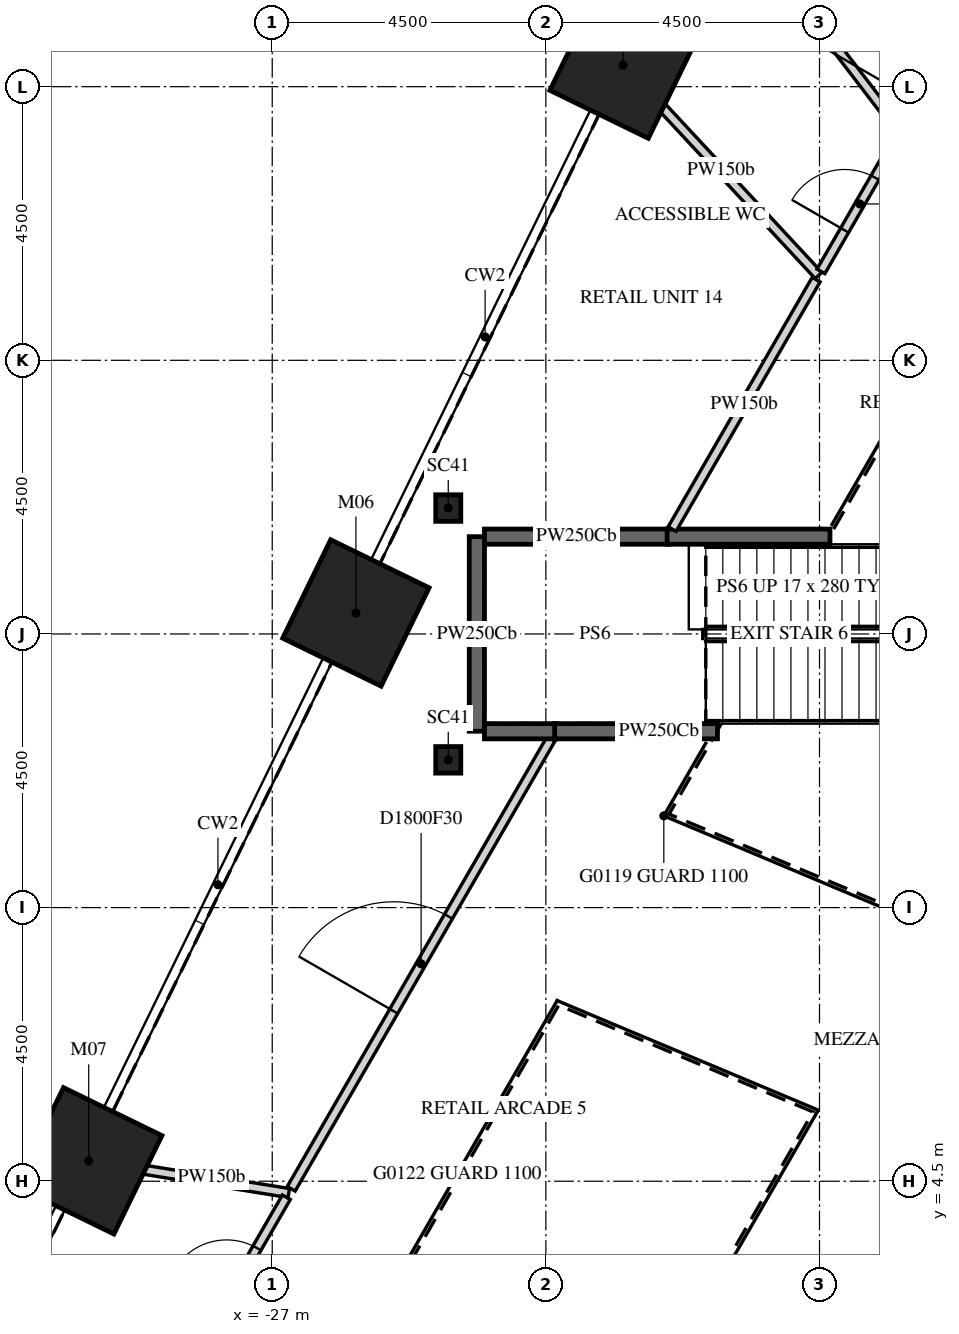
"""IFC4 building model, lengths in metres.
Left out: names, types, materials, properties, quantities, classifications, styles, units other than length and angle.
Written with IfcOpenShell. Run it as: python <this file> out.ifc"""

import sys

from ifc_helpers import new_model, si_unit, direction, frame, frame_2d, origin, origin_2d, place, context, subcontext, project, spatial, rectangle, i_section, extrude, element, fill, save


model = new_model("IFC4")
c1 = context("Model", 3, precision=1e-05, world=origin(), true_north=direction((0.0, 1.0)))
c2 = subcontext(c1, "Body", "Model", "MODEL_VIEW")
j1 = project(units=[si_unit("LENGTHUNIT", "METRE"), si_unit("PLANEANGLEUNIT", "RADIAN")], contexts=[c1])
p1 = place(None, origin())
s1 = spatial("IfcSite", under=j1, at=p1, CompositionType="ELEMENT")
p2 = place(p1, origin())
s2 = spatial("IfcBuilding", under=s1, at=p2, CompositionType="ELEMENT")
p3 = place(p2, frame((0.0, 0.0, 9.0)))
s3 = spatial("IfcBuildingStorey", under=s2, at=p3, CompositionType="ELEMENT", Elevation=9.0)
for number, where, z_axis, x_axis in (
    (1, (-21.23, 22.854, -0.25), (0.0, 0.0, 1.0), (0.438, 0.899, 0.0)),
    (2, (-25.624, 13.845, -0.25), (0.0, 0.0, 1.0), (0.438, 0.899, 0.0)),
    (3, (-30.018, 4.836, -0.25), (0.0, 0.0, 1.0), (0.438, 0.899, 0.0)),
):
    element("IfcColumn", number, at=place(p3, frame(where, z_axis=z_axis, x_axis=x_axis)), inside=s3, PredefinedType="COLUMN", context=c2, shape_type="SweptSolid", body=[
        extrude(rectangle(XDim=1.8, YDim=1.8, at=origin_2d()), origin(), (0.0, 0.0, 1.0), 6.0),
    ])
for number, where, z_axis, x_axis in (
    (4, (-24.105, 11.43, -0.25), (0.0, 0.0, 1.0), (1.0, 0.0, 0.0)),
    (5, (-24.105, 15.57, -0.25), (0.0, 0.0, 1.0), (1.0, 0.0, 0.0)),
):
    element("IfcColumn", number, at=place(p3, frame(where, z_axis=z_axis, x_axis=x_axis)), inside=s3, PredefinedType="COLUMN", context=c2, shape_type="SweptSolid", body=[
        extrude(i_section(OverallWidth=0.412, OverallDepth=0.437, WebThickness=0.036, FlangeThickness=0.058, FilletRadius=0.015, at=origin_2d()), origin(), (0.0, 0.0, 1.0), 6.0),
    ])
p4 = place(p3, frame((-30.018, 4.836, 0.0), z_axis=(0.0, 0.0, 1.0), x_axis=(0.987270453079, -0.159050471478, 0.0)))
e6 = element("IfcWall", 6, at=p4, inside=s3, PredefinedType="PARTITIONING", context=c2, shape_type="SweptSolid", body=[
    extrude(rectangle(XDim=3.333, YDim=0.15, at=frame_2d((1.666, 0.0))), origin(), (0.0, 0.0, 1.0), 5.75),
])
p5 = place(p3, frame((-28.233, 1.7, 0.0), z_axis=(0.0, 0.0, 1.0), x_axis=(0.500083180475, 0.865977374189, 0.0)))
e7 = element("IfcWall", 7, at=p5, inside=s3, PredefinedType="PARTITIONING", context=c2, shape_type="SweptSolid", body=[
    extrude(rectangle(XDim=2.929, YDim=0.15, at=frame_2d((1.465, 0.0))), origin(), (0.0, 0.0, 1.0), 5.75),
])
p6 = place(p5, frame((0.965, 0.0, 0.0)))
e8 = element("IfcOpeningElement", 8, at=p6, cuts=e7, PredefinedType="OPENING", context=c2, shape_type="SweptSolid", body=[
    extrude(rectangle(XDim=1.0, YDim=2.1, at=frame_2d((0.5, 1.05))), frame((0.0, 0.085, 0.0), z_axis=(0.0, -1.0, 0.0), x_axis=(1.0, 0.0, 0.0)), (0.0, 0.0, 1.0), 0.17),
])
p7 = place(p3, frame((-23.635, 11.9, 0.0), z_axis=(0.0, 0.0, 1.0), x_axis=(0.0, 1.0, 0.0)))
e9 = element("IfcWall", 9, at=p7, inside=s3, PredefinedType="PARTITIONING", context=c2, shape_type="SweptSolid", body=[
    extrude(rectangle(XDim=3.2, YDim=0.25, at=frame_2d((1.6, 0.0))), origin(), (0.0, 0.0, 1.0), 5.75),
])
p8 = place(p3, frame((-23.51, 15.1, 0.0), z_axis=(0.0, 0.0, 1.0), x_axis=(1.0, 0.0, 0.0)))
e10 = element("IfcWall", 10, at=p8, inside=s3, PredefinedType="PARTITIONING", context=c2, shape_type="SweptSolid", body=[
    extrude(rectangle(XDim=3.026, YDim=0.25, at=frame_2d((1.513, 0.0))), origin(), (0.0, 0.0, 1.0), 5.75),
])
p9 = place(p3, frame((-26.688, 4.375, 0.0), z_axis=(0.0, 0.0, 1.0), x_axis=(0.500057174496, 0.865992391557, 0.0)))
e11 = element("IfcWall", 11, at=p9, inside=s3, PredefinedType="PARTITIONING", context=c2, shape_type="SweptSolid", body=[
    extrude(rectangle(XDim=8.544, YDim=0.15, at=frame_2d((4.272, 0.0))), origin(), (0.0, 0.0, 1.0), 5.75),
])
p10 = place(p9, frame((3.372, 0.0, 0.0)))
e12 = element("IfcOpeningElement", 12, at=p10, cuts=e11, PredefinedType="OPENING", context=c2, shape_type="SweptSolid", body=[
    extrude(rectangle(XDim=1.8, YDim=2.1, at=frame_2d((0.9, 1.05))), frame((0.0, 0.085, 0.0), z_axis=(0.0, -1.0, 0.0), x_axis=(1.0, 0.0, 0.0)), (0.0, 0.0, 1.0), 0.17),
])
p11 = place(p3, frame((-22.333, 11.9, 0.0), z_axis=(0.0, 0.0, 1.0), x_axis=(-1.0, 0.0, 0.0)))
e13 = element("IfcWall", 13, at=p11, inside=s3, PredefinedType="PARTITIONING", context=c2, shape_type="SweptSolid", body=[
    extrude(rectangle(XDim=1.177, YDim=0.25, at=frame_2d((0.588, 0.0))), origin(), (0.0, 0.0, 1.0), 5.75),
])
p12 = place(p3, frame((-21.23, 22.854, 0.0), z_axis=(0.0, 0.0, 1.0), x_axis=(0.680673196445, -0.732587195931, 0.0)))
e14 = element("IfcWall", 14, at=p12, inside=s3, PredefinedType="PARTITIONING", context=c2, shape_type="SweptSolid", body=[
    extrude(rectangle(XDim=4.722, YDim=0.15, at=frame_2d((2.361, 0.0))), origin(), (0.0, 0.0, 1.0), 5.75),
])
p13 = place(p3, frame((-20.506, 15.1, 0.0), z_axis=(0.0, 0.0, 1.0), x_axis=(1.0, 0.0, 0.0)))
e15 = element("IfcWall", 15, at=p13, inside=s3, PredefinedType="PARTITIONING", context=c2, shape_type="SweptSolid", body=[
    extrude(rectangle(XDim=2.678, YDim=0.25, at=frame_2d((1.339, 0.0))), origin(), (0.0, 0.0, 1.0), 5.75),
])
p14 = place(p3, frame((-19.779, 25.828, 0.0), z_axis=(0.0, 0.0, 1.0), x_axis=(0.608023337324, -0.793919152855, 0.0)))
e16 = element("IfcWall", 16, at=p14, inside=s3, PredefinedType="PARTITIONING", context=c2, shape_type="SweptSolid", body=[
    extrude(rectangle(XDim=5.136, YDim=0.15, at=frame_2d((2.568, 0.0))), origin(), (0.0, 0.0, 1.0), 5.75),
])
p15 = place(p3, frame((-19.678, 11.9, 0.0), z_axis=(0.0, 0.0, 1.0), x_axis=(-1.0, 0.0, 0.0)))
e17 = element("IfcWall", 17, at=p15, inside=s3, PredefinedType="PARTITIONING", context=c2, shape_type="SweptSolid", body=[
    extrude(rectangle(XDim=2.678, YDim=0.25, at=frame_2d((1.339, 0.0))), origin(), (0.0, 0.0, 1.0), 5.75),
])
p16 = place(p3, frame((-18.055, 19.327, 0.0), z_axis=(0.0, 0.0, 1.0), x_axis=(-0.500052601127, -0.865995032379, 0.0)))
e18 = element("IfcWall", 18, at=p16, inside=s3, PredefinedType="PARTITIONING", context=c2, shape_type="SweptSolid", body=[
    extrude(rectangle(XDim=4.737, YDim=0.15, at=frame_2d((2.368, 0.0))), origin(), (0.0, 0.0, 1.0), 5.75),
])
p17 = place(p3, frame((-17.977, 19.463, 0.0), z_axis=(0.0, 0.0, 1.0), x_axis=(0.500118698802, 0.865956862152, 0.0)))
e19 = element("IfcWall", 19, at=p17, inside=s3, PredefinedType="PARTITIONING", context=c2, shape_type="SweptSolid", body=[
    extrude(rectangle(XDim=2.56, YDim=0.15, at=frame_2d((1.28, 0.0))), origin(), (0.0, 0.0, 1.0), 5.75),
])
p18 = place(p17, frame((0.78, 0.0, 0.0)))
e20 = element("IfcOpeningElement", 20, at=p18, cuts=e19, PredefinedType="OPENING", context=c2, shape_type="SweptSolid", body=[
    extrude(rectangle(XDim=1.0, YDim=2.1, at=frame_2d((0.5, 1.05))), frame((0.0, 0.085, 0.0), z_axis=(0.0, -1.0, 0.0), x_axis=(1.0, 0.0, 0.0)), (0.0, 0.0, 1.0), 0.17),
])
p19 = place(p6, origin())
e21 = element("IfcDoor", 21, at=p19, inside=s3, OperationType="SINGLE_SWING_LEFT", PredefinedType="DOOR", context=c2, shape_type="SweptSolid", body=[
    extrude(rectangle(XDim=1.0, YDim=2.1, at=frame_2d((0.5, 1.05))), frame((0.0, 0.025, 0.0), z_axis=(0.0, -1.0, 0.0), x_axis=(1.0, 0.0, 0.0)), (0.0, 0.0, 1.0), 0.05),
])
fill(e8, e21)
p20 = place(p10, origin())
e22 = element("IfcDoor", 22, at=p20, inside=s3, OperationType="DOUBLE_DOOR_SINGLE_SWING", PredefinedType="DOOR", context=c2, shape_type="SweptSolid", body=[
    extrude(rectangle(XDim=1.8, YDim=2.1, at=frame_2d((0.9, 1.05))), frame((0.0, 0.025, 0.0), z_axis=(0.0, -1.0, 0.0), x_axis=(1.0, 0.0, 0.0)), (0.0, 0.0, 1.0), 0.05),
])
fill(e12, e22)
p21 = place(p18, origin())
e23 = element("IfcDoor", 23, at=p21, inside=s3, OperationType="SINGLE_SWING_LEFT", PredefinedType="DOOR", context=c2, shape_type="SweptSolid", body=[
    extrude(rectangle(XDim=1.0, YDim=2.1, at=frame_2d((0.5, 1.05))), frame((0.0, 0.025, 0.0), z_axis=(0.0, -1.0, 0.0), x_axis=(1.0, 0.0, 0.0)), (0.0, 0.0, 1.0), 0.05),
])
fill(e20, e23)
save(model, sys.argv[1])
